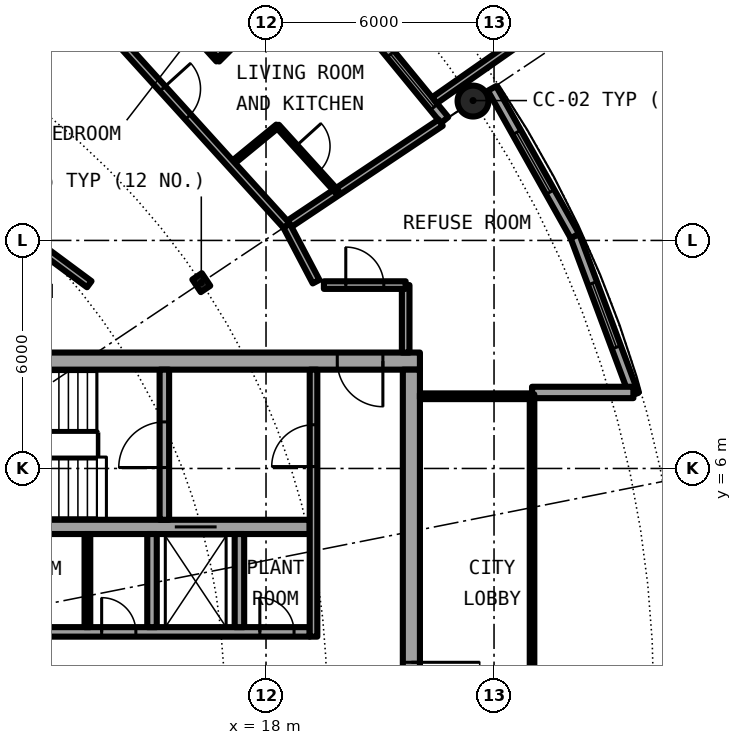
"""IFC4 building model, lengths in metres.
Left out: names, types, materials, properties, quantities, classifications, styles, units other than length and angle.
Written with IfcOpenShell. Run it as: python <this file> out.ifc"""

import sys

from ifc_helpers import new_model, si_unit, direction, frame, frame_2d, origin, origin_2d, place, context, subcontext, project, spatial, rectangle, hollow_circle, i_section, extrude, element, fill, save


model = new_model("IFC4")
c1 = context("Model", 3, precision=1e-05, world=origin(), true_north=direction((0.0, 1.0)))
c2 = subcontext(c1, "Body", "Model", "MODEL_VIEW")
j1 = project(units=[si_unit("LENGTHUNIT", "METRE"), si_unit("PLANEANGLEUNIT", "RADIAN")], contexts=[c1])
p1 = place(None, origin())
s1 = spatial("IfcSite", under=j1, at=p1, CompositionType="ELEMENT")
p2 = place(p1, origin())
s2 = spatial("IfcBuilding", under=s1, at=p2, CompositionType="ELEMENT")
p3 = place(p2, frame((0.0, 0.0, 202.4)))
s3 = spatial("IfcBuildingStorey", under=s2, at=p3, CompositionType="ELEMENT", Elevation=202.4)
p4 = place(p3, frame((23.448, 15.667, 0.0), z_axis=(0.0, 0.0, 1.0), x_axis=(1.0, 0.0, 0.0)))
e1 = element("IfcColumn", 1, at=p4, inside=s3, PredefinedType="COLUMN", context=c2, shape_type="SweptSolid", body=[
    extrude(hollow_circle(Radius=0.406, WallThickness=0.03, at=origin_2d()), origin(), (0.0, 0.0, 1.0), 3.05),
])
p5 = place(p3, frame((16.297, 10.889, 0.0), z_axis=(0.0, 0.0, 1.0), x_axis=(0.831469612303, 0.55557023302, 0.0)))
e2 = element("IfcColumn", 2, at=p5, inside=s3, PredefinedType="COLUMN", context=c2, shape_type="SweptSolid", body=[
    extrude(i_section(OverallWidth=0.3, OverallDepth=0.4, WebThickness=0.013, FlangeThickness=0.024, FilletRadius=0.027, at=origin_2d()), origin(), (0.0, 0.0, 1.0), 3.05),
])
p6 = place(p3, frame((22.699, 15.167, 0.0), z_axis=(0.0, 0.0, 1.0), x_axis=(-0.634382322723, 0.773019449054, 0.0)))
e3 = element("IfcWall", 3, at=p6, inside=s3, PredefinedType="SOLIDWALL", context=c2, shape_type="SweptSolid", body=[
    extrude(rectangle(XDim=5.352, YDim=0.25, at=frame_2d((2.676, 0.0))), origin(), (0.0, 0.0, 1.0), 2.7),
])
p7 = place(p6, frame((0.441, 0.0, 0.3)))
e4 = element("IfcOpeningElement", 4, at=p7, cuts=e3, PredefinedType="OPENING", context=c2, shape_type="SweptSolid", body=[
    extrude(rectangle(XDim=1.8, YDim=2.1, at=frame_2d((0.9, 1.05))), frame((0.0, 0.135, 0.0), z_axis=(0.0, -1.0, 0.0), x_axis=(1.0, 0.0, 0.0)), (0.0, 0.0, 1.0), 0.27),
])
p8 = place(p6, frame((3.51, 0.0, 0.0)))
e5 = element("IfcOpeningElement", 5, at=p8, cuts=e3, PredefinedType="OPENING", context=c2, shape_type="SweptSolid", body=[
    extrude(rectangle(XDim=1.0, YDim=2.2, at=frame_2d((0.5, 1.1))), frame((0.0, 0.135, 0.0), z_axis=(0.0, -1.0, 0.0), x_axis=(1.0, 0.0, 0.0)), (0.0, 0.0, 1.0), 0.27),
])
p9 = place(p3, frame((22.433, 15.688, -0.03), z_axis=(0.0, 0.0, 1.0), x_axis=(0.819373043115, 0.573260687834, 0.0)))
e6 = element("IfcWall", 6, at=p9, inside=s3, PredefinedType="SOLIDWALL", context=c2, shape_type="SweptSolid", body=[
    extrude(rectangle(XDim=2.925, YDim=0.2, at=frame_2d((1.463, 0.0))), origin(), (0.0, 0.0, 1.0), 2.73),
])
p10 = place(p3, frame((27.682, 7.945, 0.0), z_axis=(0.0, 0.0, 1.0), x_axis=(-0.349247811493, 0.937030397675, 0.0)))
e7 = element("IfcWall", 7, at=p10, inside=s3, PredefinedType="SOLIDWALL", context=c2, shape_type="SweptSolid", body=[
    extrude(rectangle(XDim=4.452, YDim=0.25, at=frame_2d((2.226, 0.0))), origin(), (0.0, 0.0, 1.0), 2.7),
])
p11 = place(p10, frame((1.327, 0.0, 0.3)))
e8 = element("IfcOpeningElement", 8, at=p11, cuts=e7, PredefinedType="OPENING", context=c2, shape_type="SweptSolid", body=[
    extrude(rectangle(XDim=1.8, YDim=2.1, at=frame_2d((0.9, 1.05))), frame((0.0, 0.135, 0.0), z_axis=(0.0, -1.0, 0.0), x_axis=(1.0, 0.0, 0.0)), (0.0, 0.0, 1.0), 0.27),
])
p12 = place(p3, frame((26.127, 12.117, 0.0), z_axis=(0.0, 0.0, 1.0), x_axis=(-0.489696356642, 0.871893042919, 0.0)))
e9 = element("IfcWall", 9, at=p12, inside=s3, PredefinedType="SOLIDWALL", context=c2, shape_type="SweptSolid", body=[
    extrude(rectangle(XDim=4.454, YDim=0.25, at=frame_2d((2.227, 0.0))), origin(), (0.0, 0.0, 1.0), 2.7),
])
p13 = place(p12, frame((1.327, 0.0, 0.3)))
e10 = element("IfcOpeningElement", 10, at=p13, cuts=e9, PredefinedType="OPENING", context=c2, shape_type="SweptSolid", body=[
    extrude(rectangle(XDim=1.8, YDim=2.1, at=frame_2d((0.9, 1.05))), frame((0.0, 0.135, 0.0), z_axis=(0.0, -1.0, 0.0), x_axis=(1.0, 0.0, 0.0)), (0.0, 0.0, 1.0), 0.27),
])
p14 = place(p3, frame((25.0, 8.0, 0.0), z_axis=(0.0, 0.0, 1.0), x_axis=(1.0, 0.0, 0.0)))
e11 = element("IfcWall", 11, at=p14, inside=s3, PredefinedType="SOLIDWALL", context=c2, shape_type="SweptSolid", body=[
    extrude(rectangle(XDim=2.667, YDim=0.3, at=frame_2d((1.333, 0.0))), origin(), (0.0, 0.0, 1.0), 2.7),
])
p15 = place(p3, frame((22.05, 8.825, 0.0), z_axis=(0.0, 0.0, 1.0), x_axis=(-1.0, 0.0, 0.0)))
e12 = element("IfcWall", 12, at=p15, inside=s3, PredefinedType="SHEAR", context=c2, shape_type="SweptSolid", body=[
    extrude(rectangle(XDim=13.5, YDim=0.45, at=frame_2d((6.75, 0.0))), origin(), (0.0, 0.0, 1.0), 3.05),
])
p16 = place(p15, frame((0.975, 0.0, 0.0)))
e13 = element("IfcOpeningElement", 13, at=p16, cuts=e12, PredefinedType="OPENING", context=c2, shape_type="SweptSolid", body=[
    extrude(rectangle(XDim=1.2, YDim=2.3, at=frame_2d((0.6, 1.15))), frame((0.0, 0.235, 0.0), z_axis=(0.0, -1.0, 0.0), x_axis=(1.0, 0.0, 0.0)), (0.0, 0.0, 1.0), 0.47),
])
p17 = place(p3, frame((21.825, 8.6, 0.0), z_axis=(0.0, 0.0, 1.0), x_axis=(0.0, -1.0, 0.0)))
e14 = element("IfcWall", 14, at=p17, inside=s3, PredefinedType="SHEAR", context=c2, shape_type="SweptSolid", body=[
    extrude(rectangle(XDim=17.2, YDim=0.45, at=frame_2d((8.6, 0.0))), origin(), (0.0, 0.0, 1.0), 3.05),
])
p18 = place(p17, frame((7.7, 0.0, 0.0)))
e15 = element("IfcOpeningElement", 15, at=p18, cuts=e14, PredefinedType="OPENING", context=c2, shape_type="SweptSolid", body=[
    extrude(rectangle(XDim=1.8, YDim=2.3, at=frame_2d((0.9, 1.15))), frame((0.0, 0.235, 0.0), z_axis=(0.0, -1.0, 0.0), x_axis=(1.0, 0.0, 0.0)), (0.0, 0.0, 1.0), 0.47),
])
p19 = place(p3, frame((9.0, 1.7, 0.0), z_axis=(0.0, 0.0, 1.0), x_axis=(1.0, 0.0, 0.0)))
e16 = element("IfcWall", 16, at=p19, inside=s3, PredefinedType="SHEAR", context=c2, shape_type="SweptSolid", body=[
    extrude(rectangle(XDim=10.15, YDim=0.25, at=frame_2d((5.075, 0.0))), origin(), (0.0, 0.0, 1.0), 3.05),
])
p20 = place(p19, frame((1.663, 0.0, 0.0)))
e17 = element("IfcOpeningElement", 17, at=p20, cuts=e16, PredefinedType="OPENING", context=c2, shape_type="SweptSolid", body=[
    extrude(rectangle(XDim=0.9, YDim=2.3, at=frame_2d((0.45, 1.15))), frame((0.0, 0.135, 0.0), z_axis=(0.0, -1.0, 0.0), x_axis=(1.0, 0.0, 0.0)), (0.0, 0.0, 1.0), 0.27),
])
p21 = place(p19, frame((4.675, 0.0, 0.0)))
e18 = element("IfcOpeningElement", 18, at=p21, cuts=e16, PredefinedType="OPENING", context=c2, shape_type="SweptSolid", body=[
    extrude(rectangle(XDim=0.9, YDim=2.3, at=frame_2d((0.45, 1.15))), frame((0.0, 0.135, 0.0), z_axis=(0.0, -1.0, 0.0), x_axis=(1.0, 0.0, 0.0)), (0.0, 0.0, 1.0), 0.27),
])
p22 = place(p19, frame((8.837, 0.0, 0.0)))
e19 = element("IfcOpeningElement", 19, at=p22, cuts=e16, PredefinedType="OPENING", context=c2, shape_type="SweptSolid", body=[
    extrude(rectangle(XDim=0.9, YDim=2.3, at=frame_2d((0.45, 1.15))), frame((0.0, 0.135, 0.0), z_axis=(0.0, -1.0, 0.0), x_axis=(1.0, 0.0, 0.0)), (0.0, 0.0, 1.0), 0.27),
])
p23 = place(p3, frame((9.0, 4.462, 0.0), z_axis=(0.0, 0.0, 1.0), x_axis=(1.0, 0.0, 0.0)))
e20 = element("IfcWall", 20, at=p23, inside=s3, PredefinedType="SHEAR", context=c2, shape_type="SweptSolid", body=[
    extrude(rectangle(XDim=10.15, YDim=0.375, at=frame_2d((5.075, 0.0))), origin(), (0.0, 0.0, 1.0), 3.05),
])
p24 = place(p23, frame((6.6, 0.0, 0.0)))
e21 = element("IfcOpeningElement", 21, at=p24, cuts=e20, PredefinedType="OPENING", context=c2, shape_type="SweptSolid", body=[
    extrude(rectangle(XDim=1.1, YDim=2.3, at=frame_2d((0.55, 1.15))), frame((0.0, 0.198, 0.0), z_axis=(0.0, -1.0, 0.0), x_axis=(1.0, 0.0, 0.0)), (0.0, 0.0, 1.0), 0.395),
])
p25 = place(p3, frame((15.325, 4.65, 0.0), z_axis=(0.0, 0.0, 1.0), x_axis=(0.0, 1.0, 0.0)))
e22 = element("IfcWall", 22, at=p25, inside=s3, PredefinedType="SHEAR", context=c2, shape_type="SweptSolid", body=[
    extrude(rectangle(XDim=3.95, YDim=0.25, at=frame_2d((1.975, 0.0))), origin(), (0.0, 0.0, 1.0), 3.05),
])
p26 = place(p25, frame((1.375, 0.0, 0.0)))
e23 = element("IfcOpeningElement", 23, at=p26, cuts=e22, PredefinedType="OPENING", context=c2, shape_type="SweptSolid", body=[
    extrude(rectangle(XDim=1.2, YDim=2.3, at=frame_2d((0.6, 1.15))), frame((0.0, 0.135, 0.0), z_axis=(0.0, -1.0, 0.0), x_axis=(1.0, 0.0, 0.0)), (0.0, 0.0, 1.0), 0.27),
])
for number, where, z_axis, x_axis in (
    (24, (15.0, 1.825, 0.0), (0.0, 0.0, 1.0), (0.0, 1.0, 0.0)),
    (25, (17.3, 1.825, 0.0), (0.0, 0.0, 1.0), (0.0, 1.0, 0.0)),
):
    element("IfcWall", number, at=place(p3, frame(where, z_axis=z_axis, x_axis=x_axis)), inside=s3, PredefinedType="SOLIDWALL", context=c2, shape_type="SweptSolid", body=[
        extrude(rectangle(XDim=2.45, YDim=0.25, at=frame_2d((1.225, 0.0))), origin(), (0.0, 0.0, 1.0), 2.7),
    ])
p27 = place(p3, frame((19.25, 1.575, 0.0), z_axis=(0.0, 0.0, 1.0), x_axis=(0.0, 1.0, 0.0)))
e26 = element("IfcWall", 26, at=p27, inside=s3, PredefinedType="SOLIDWALL", context=c2, shape_type="SweptSolid", body=[
    extrude(rectangle(XDim=7.025, YDim=0.2, at=frame_2d((3.513, 0.0))), origin(), (0.0, 0.0, 1.0), 2.7),
])
p28 = place(p27, frame((4.475, 0.0, 0.0)))
e27 = element("IfcOpeningElement", 27, at=p28, cuts=e26, PredefinedType="OPENING", context=c2, shape_type="SweptSolid", body=[
    extrude(rectangle(XDim=1.1, YDim=2.3, at=frame_2d((0.55, 1.15))), frame((0.0, 0.11, 0.0), z_axis=(0.0, -1.0, 0.0), x_axis=(1.0, 0.0, 0.0)), (0.0, 0.0, 1.0), 0.22),
])
p29 = place(p3, frame((13.3, 1.825, 0.0), z_axis=(0.0, 0.0, 1.0), x_axis=(0.0, 1.0, 0.0)))
e28 = element("IfcWall", 28, at=p29, inside=s3, PredefinedType="PARTITIONING", context=c2, shape_type="SweptSolid", body=[
    extrude(rectangle(XDim=2.45, YDim=0.15, at=frame_2d((1.225, 0.0))), origin(), (0.0, 0.0, 1.0), 2.7),
])
p30 = place(p3, frame((22.05, 7.9, 0.0), z_axis=(0.0, 0.0, 1.0), x_axis=(1.0, 0.0, 0.0)))
e29 = element("IfcWall", 29, at=p30, inside=s3, PredefinedType="PARTITIONING", context=c2, shape_type="SweptSolid", body=[
    extrude(rectangle(XDim=2.89, YDim=0.15, at=frame_2d((1.445, 0.0))), origin(), (0.0, 0.0, 1.0), 2.7),
])
p31 = place(p3, frame((25.0, -7.95, 0.0), z_axis=(0.0, 0.0, 1.0), x_axis=(0.0, 1.0, 0.0)))
e30 = element("IfcWall", 30, at=p31, inside=s3, PredefinedType="PARTITIONING", context=c2, shape_type="SweptSolid", body=[
    extrude(rectangle(XDim=15.9, YDim=0.12, at=frame_2d((7.95, 0.0))), origin(), (0.0, 0.0, 1.0), 2.7),
])
p32 = place(p31, frame((0.95, 0.0, 0.1)))
e31 = element("IfcOpeningElement", 31, at=p32, cuts=e30, PredefinedType="OPENING", context=c2, shape_type="SweptSolid", body=[
    extrude(rectangle(XDim=14.0, YDim=2.35, at=frame_2d((7.0, 1.175))), frame((0.0, 0.07, 0.0), z_axis=(0.0, -1.0, 0.0), x_axis=(1.0, 0.0, 0.0)), (0.0, 0.0, 1.0), 0.14),
])
p33 = place(p3, frame((21.675, 9.05, 0.0), z_axis=(0.0, 0.0, 1.0), x_axis=(0.0, 1.0, 0.0)))
e32 = element("IfcWall", 32, at=p33, inside=s3, PredefinedType="PARTITIONING", context=c2, shape_type="SweptSolid", body=[
    extrude(rectangle(XDim=1.775, YDim=0.2, at=frame_2d((0.887, 0.0))), origin(), (0.0, 0.0, 1.0), 2.7),
])
p34 = place(p3, frame((16.732, 16.743, 0.0), z_axis=(0.0, 0.0, 1.0), x_axis=(0.706967463531, 0.707246071398, 0.0)))
e33 = element("IfcWall", 33, at=p34, inside=s3, PredefinedType="PARTITIONING", context=c2, shape_type="SweptSolid", body=[
    extrude(rectangle(XDim=3.505, YDim=0.1, at=frame_2d((1.752, 0.0))), origin(), (0.0, 0.0, 1.0), 2.7),
])
p35 = place(p34, frame((1.303, 0.0, 0.0)))
e34 = element("IfcOpeningElement", 34, at=p35, cuts=e33, PredefinedType="OPENING", context=c2, shape_type="SweptSolid", body=[
    extrude(rectangle(XDim=0.9, YDim=2.3, at=frame_2d((0.45, 1.15))), frame((0.0, 0.06, 0.0), z_axis=(0.0, -1.0, 0.0), x_axis=(1.0, 0.0, 0.0)), (0.0, 0.0, 1.0), 0.12),
])
p36 = place(p3, frame((18.542, 12.389, 0.0), z_axis=(0.0, 0.0, 1.0), x_axis=(0.831387096605, 0.55569370664, 0.0)))
e35 = element("IfcWall", 35, at=p36, inside=s3, PredefinedType="PARTITIONING", context=c2, shape_type="SweptSolid", body=[
    extrude(rectangle(XDim=4.875, YDim=0.2, at=frame_2d((2.438, 0.0))), origin(), (0.0, 0.0, 1.0), 2.7),
])
p37 = place(p3, frame((17.077, 14.006, 0.0), z_axis=(0.0, 0.0, 1.0), x_axis=(0.773476341377, 0.633825172528, 0.0)))
e36 = element("IfcWall", 36, at=p37, inside=s3, PredefinedType="PARTITIONING", context=c2, shape_type="SweptSolid", body=[
    extrude(rectangle(XDim=1.584, YDim=0.1, at=frame_2d((0.792, 0.0))), origin(), (0.0, 0.0, 1.0), 2.7),
])
p38 = place(p3, frame((19.523, 10.825, 0.0), z_axis=(0.0, 0.0, 1.0), x_axis=(1.0, 0.0, 0.0)))
e37 = element("IfcWall", 37, at=p38, inside=s3, PredefinedType="PARTITIONING", context=c2, shape_type="SweptSolid", body=[
    extrude(rectangle(XDim=2.152, YDim=0.2, at=frame_2d((1.076, 0.0))), origin(), (0.0, 0.0, 1.0), 2.7),
])
p39 = place(p38, frame((0.576, 0.0, 0.0)))
e38 = element("IfcOpeningElement", 38, at=p39, cuts=e37, PredefinedType="OPENING", context=c2, shape_type="SweptSolid", body=[
    extrude(rectangle(XDim=1.0, YDim=2.3, at=frame_2d((0.5, 1.15))), frame((0.0, 0.11, 0.0), z_axis=(0.0, -1.0, 0.0), x_axis=(1.0, 0.0, 0.0)), (0.0, 0.0, 1.0), 0.22),
])
p40 = place(p3, frame((5.137, 16.938, 0.0), z_axis=(0.0, 0.0, 1.0), x_axis=(0.803229232922, -0.595670042371, 0.0)))
e39 = element("IfcWall", 39, at=p40, inside=s3, PredefinedType="PARTITIONING", context=c2, shape_type="SweptSolid", body=[
    extrude(rectangle(XDim=10.224, YDim=0.2, at=frame_2d((5.112, 0.0))), origin(), (0.0, 0.0, 1.0), 2.7),
])
p41 = place(p40, frame((4.612, 0.0, 0.0)))
e40 = element("IfcOpeningElement", 40, at=p41, cuts=e39, PredefinedType="OPENING", context=c2, shape_type="SweptSolid", body=[
    extrude(rectangle(XDim=1.0, YDim=2.3, at=frame_2d((0.5, 1.15))), frame((0.0, 0.11, 0.0), z_axis=(0.0, -1.0, 0.0), x_axis=(1.0, 0.0, 0.0)), (0.0, 0.0, 1.0), 0.22),
])
p42 = place(p3, frame((14.147, 17.238, 0.0), z_axis=(0.0, 0.0, 1.0), x_axis=(0.671561669125, -0.740948665268, 0.0)))
e41 = element("IfcWall", 41, at=p42, inside=s3, PredefinedType="PARTITIONING", context=c2, shape_type="SweptSolid", body=[
    extrude(rectangle(XDim=6.544, YDim=0.2, at=frame_2d((3.272, 0.0))), origin(), (0.0, 0.0, 1.0), 2.7),
])
p43 = place(p42, frame((1.682, 0.0, 0.0)))
e42 = element("IfcOpeningElement", 42, at=p43, cuts=e41, PredefinedType="OPENING", context=c2, shape_type="SweptSolid", body=[
    extrude(rectangle(XDim=1.0, YDim=2.3, at=frame_2d((0.5, 1.15))), frame((0.0, 0.11, 0.0), z_axis=(0.0, -1.0, 0.0), x_axis=(1.0, 0.0, 0.0)), (0.0, 0.0, 1.0), 0.22),
])
p44 = place(p3, frame((18.542, 12.389, 0.0), z_axis=(0.0, 0.0, 1.0), x_axis=(0.465359652486, -0.885121683068, 0.0)))
e43 = element("IfcWall", 43, at=p44, inside=s3, PredefinedType="PARTITIONING", context=c2, shape_type="SweptSolid", body=[
    extrude(rectangle(XDim=1.665, YDim=0.2, at=frame_2d((0.833, 0.0))), origin(), (0.0, 0.0, 1.0), 2.7),
])
p45 = place(p3, frame((15.162, 18.475, 0.0), z_axis=(0.0, 0.0, 1.0), x_axis=(0.671528384412, -0.740978831634, 0.0)))
e44 = element("IfcWall", 44, at=p45, inside=s3, PredefinedType="PARTITIONING", context=c2, shape_type="SweptSolid", body=[
    extrude(rectangle(XDim=2.338, YDim=0.1, at=frame_2d((1.169, 0.0))), origin(), (0.0, 0.0, 1.0), 2.7),
])
p46 = place(p3, frame((18.302, 15.01, 0.0), z_axis=(0.0, 0.0, 1.0), x_axis=(0.671637685376, -0.740879760544, 0.0)))
e45 = element("IfcWall", 45, at=p46, inside=s3, PredefinedType="PARTITIONING", context=c2, shape_type="SweptSolid", body=[
    extrude(rectangle(XDim=2.338, YDim=0.1, at=frame_2d((1.169, 0.0))), origin(), (0.0, 0.0, 1.0), 2.7),
])
p47 = place(p46, frame((0.719, 0.0, 0.0)))
e46 = element("IfcOpeningElement", 46, at=p47, cuts=e45, PredefinedType="OPENING", context=c2, shape_type="SweptSolid", body=[
    extrude(rectangle(XDim=0.9, YDim=2.3, at=frame_2d((0.45, 1.15))), frame((0.0, 0.06, 0.0), z_axis=(0.0, -1.0, 0.0), x_axis=(1.0, 0.0, 0.0)), (0.0, 0.0, 1.0), 0.12),
])
p48 = place(p7, origin())
e47 = element("IfcWindow", 47, at=p48, inside=s3, PartitioningType="SINGLE_PANEL", PredefinedType="WINDOW", context=c2, shape_type="SweptSolid", body=[
    extrude(rectangle(XDim=1.8, YDim=2.1, at=frame_2d((0.9, 1.05))), frame((0.0, 0.03, 0.0), z_axis=(0.0, -1.0, 0.0), x_axis=(1.0, 0.0, 0.0)), (0.0, 0.0, 1.0), 0.06),
])
fill(e4, e47)
p49 = place(p11, origin())
e48 = element("IfcWindow", 48, at=p49, inside=s3, PartitioningType="SINGLE_PANEL", PredefinedType="WINDOW", context=c2, shape_type="SweptSolid", body=[
    extrude(rectangle(XDim=1.8, YDim=2.1, at=frame_2d((0.9, 1.05))), frame((0.0, 0.03, 0.0), z_axis=(0.0, -1.0, 0.0), x_axis=(1.0, 0.0, 0.0)), (0.0, 0.0, 1.0), 0.06),
])
fill(e8, e48)
p50 = place(p13, origin())
e49 = element("IfcWindow", 49, at=p50, inside=s3, PartitioningType="SINGLE_PANEL", PredefinedType="WINDOW", context=c2, shape_type="SweptSolid", body=[
    extrude(rectangle(XDim=1.8, YDim=2.1, at=frame_2d((0.9, 1.05))), frame((0.0, 0.03, 0.0), z_axis=(0.0, -1.0, 0.0), x_axis=(1.0, 0.0, 0.0)), (0.0, 0.0, 1.0), 0.06),
])
fill(e10, e49)
p51 = place(p24, origin())
e50 = element("IfcDoor", 50, at=p51, inside=s3, OperationType="DOUBLE_DOOR_SLIDING", PredefinedType="DOOR", context=c2, shape_type="SweptSolid", body=[
    extrude(rectangle(XDim=1.1, YDim=2.3, at=frame_2d((0.55, 1.15))), frame((0.0, 0.025, 0.0), z_axis=(0.0, -1.0, 0.0), x_axis=(1.0, 0.0, 0.0)), (0.0, 0.0, 1.0), 0.05),
])
fill(e21, e50)
p52 = place(p21, origin())
e51 = element("IfcDoor", 51, at=p52, inside=s3, OperationType="SINGLE_SWING_LEFT", PredefinedType="DOOR", context=c2, shape_type="SweptSolid", body=[
    extrude(rectangle(XDim=0.9, YDim=2.3, at=frame_2d((0.45, 1.15))), frame((0.0, 0.025, 0.0), z_axis=(0.0, -1.0, 0.0), x_axis=(1.0, 0.0, 0.0)), (0.0, 0.0, 1.0), 0.05),
])
fill(e18, e51)
p53 = place(p22, origin())
e52 = element("IfcDoor", 52, at=p53, inside=s3, OperationType="SINGLE_SWING_LEFT", PredefinedType="DOOR", context=c2, shape_type="SweptSolid", body=[
    extrude(rectangle(XDim=0.9, YDim=2.3, at=frame_2d((0.45, 1.15))), frame((0.0, 0.025, 0.0), z_axis=(0.0, -1.0, 0.0), x_axis=(1.0, 0.0, 0.0)), (0.0, 0.0, 1.0), 0.05),
])
fill(e19, e52)
p54 = place(p26, origin())
e53 = element("IfcDoor", 53, at=p54, inside=s3, OperationType="SINGLE_SWING_LEFT", PredefinedType="DOOR", context=c2, shape_type="SweptSolid", body=[
    extrude(rectangle(XDim=1.2, YDim=2.3, at=frame_2d((0.6, 1.15))), frame((0.0, 0.025, 0.0), z_axis=(0.0, -1.0, 0.0), x_axis=(1.0, 0.0, 0.0)), (0.0, 0.0, 1.0), 0.05),
])
fill(e23, e53)
p55 = place(p28, origin())
e54 = element("IfcDoor", 54, at=p55, inside=s3, OperationType="SINGLE_SWING_LEFT", PredefinedType="DOOR", context=c2, shape_type="SweptSolid", body=[
    extrude(rectangle(XDim=1.1, YDim=2.3, at=frame_2d((0.55, 1.15))), frame((0.0, 0.025, 0.0), z_axis=(0.0, -1.0, 0.0), x_axis=(1.0, 0.0, 0.0)), (0.0, 0.0, 1.0), 0.05),
])
fill(e27, e54)
p56 = place(p16, origin())
e55 = element("IfcDoor", 55, at=p56, inside=s3, OperationType="SINGLE_SWING_RIGHT", PredefinedType="DOOR", context=c2, shape_type="SweptSolid", body=[
    extrude(rectangle(XDim=1.2, YDim=2.3, at=frame_2d((0.6, 1.15))), frame((0.0, 0.025, 0.0), z_axis=(0.0, -1.0, 0.0), x_axis=(1.0, 0.0, 0.0)), (0.0, 0.0, 1.0), 0.05),
])
fill(e13, e55)
p57 = place(p18, origin())
e56 = element("IfcDoor", 56, at=p57, inside=s3, OperationType="SINGLE_SWING_LEFT", PredefinedType="DOOR", context=c2, shape_type="SweptSolid", body=[
    extrude(rectangle(XDim=1.8, YDim=2.3, at=frame_2d((0.9, 1.15))), frame((0.0, 0.025, 0.0), z_axis=(0.0, -1.0, 0.0), x_axis=(1.0, 0.0, 0.0)), (0.0, 0.0, 1.0), 0.05),
])
fill(e15, e56)
p58 = place(p32, origin())
e57 = element("IfcWindow", 57, at=p58, inside=s3, PartitioningType="SINGLE_PANEL", PredefinedType="WINDOW", context=c2, shape_type="SweptSolid", body=[
    extrude(rectangle(XDim=14.0, YDim=2.35, at=frame_2d((7.0, 1.175))), frame((0.0, 0.03, 0.0), z_axis=(0.0, -1.0, 0.0), x_axis=(1.0, 0.0, 0.0)), (0.0, 0.0, 1.0), 0.06),
])
fill(e31, e57)
p59 = place(p43, origin())
e58 = element("IfcDoor", 58, at=p59, inside=s3, OperationType="SINGLE_SWING_LEFT", PredefinedType="DOOR", context=c2, shape_type="SweptSolid", body=[
    extrude(rectangle(XDim=1.0, YDim=2.3, at=frame_2d((0.5, 1.15))), frame((0.0, 0.025, 0.0), z_axis=(0.0, -1.0, 0.0), x_axis=(1.0, 0.0, 0.0)), (0.0, 0.0, 1.0), 0.05),
])
fill(e42, e58)
p60 = place(p47, origin())
e59 = element("IfcDoor", 59, at=p60, inside=s3, OperationType="SINGLE_SWING_RIGHT", PredefinedType="DOOR", context=c2, shape_type="SweptSolid", body=[
    extrude(rectangle(XDim=0.9, YDim=2.3, at=frame_2d((0.45, 1.15))), frame((0.0, 0.025, 0.0), z_axis=(0.0, -1.0, 0.0), x_axis=(1.0, 0.0, 0.0)), (0.0, 0.0, 1.0), 0.05),
])
fill(e46, e59)
p61 = place(p39, origin())
e60 = element("IfcDoor", 60, at=p61, inside=s3, OperationType="SINGLE_SWING_LEFT", PredefinedType="DOOR", context=c2, shape_type="SweptSolid", body=[
    extrude(rectangle(XDim=1.0, YDim=2.3, at=frame_2d((0.5, 1.15))), frame((0.0, 0.025, 0.0), z_axis=(0.0, -1.0, 0.0), x_axis=(1.0, 0.0, 0.0)), (0.0, 0.0, 1.0), 0.05),
])
fill(e38, e60)
save(model, sys.argv[1])
